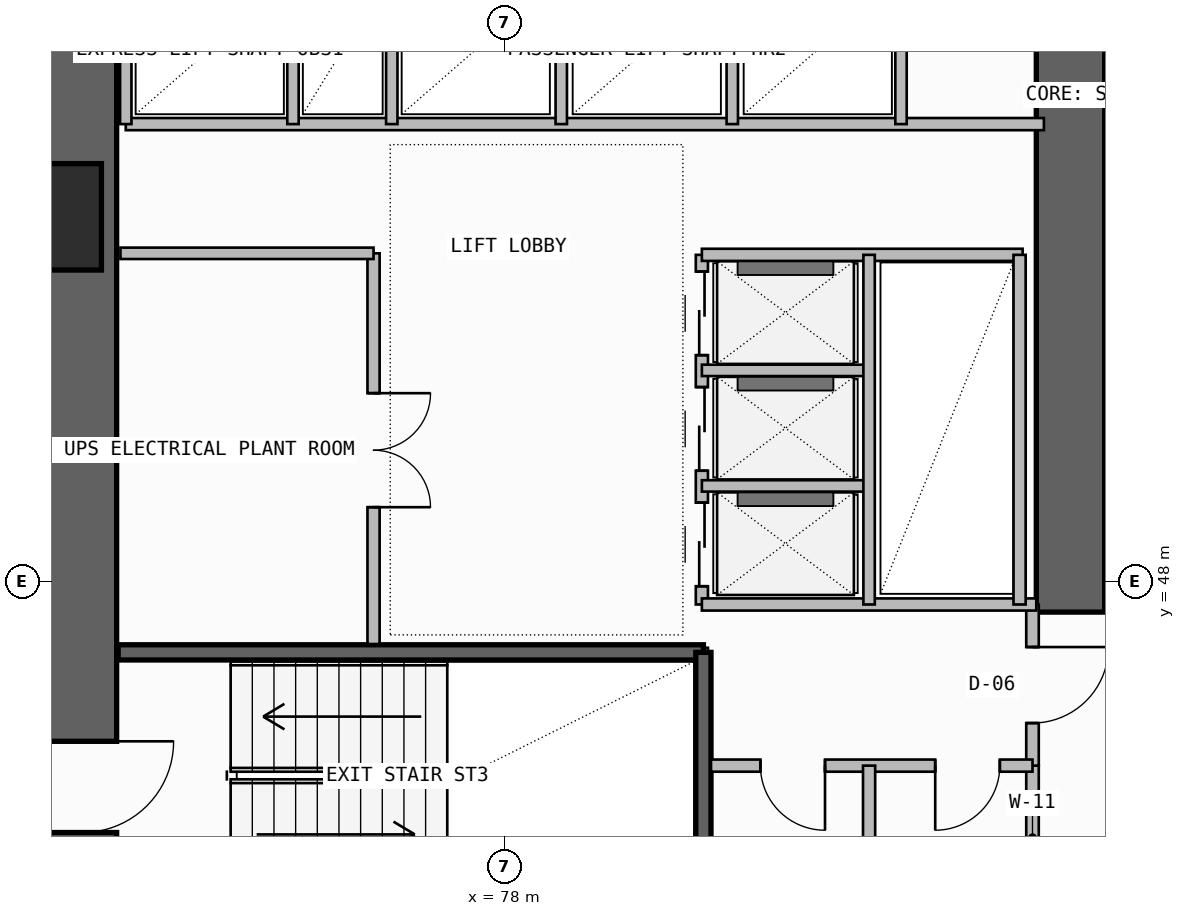
"""IFC4 building model, lengths in metres.
Left out: names, types, materials, properties, quantities, classifications, styles, units other than length and angle.
Written with IfcOpenShell. Run it as: python <this file> out.ifc"""

import sys

from ifc_helpers import new_model, si_unit, direction, frame, frame_2d, origin, origin_2d, place, context, subcontext, project, spatial, rectangle, extrude, element, fill, save


model = new_model("IFC4")
c1 = context("Model", 3, precision=1e-05, world=origin(), true_north=direction((0.0, 1.0)))
c2 = subcontext(c1, "Body", "Model", "MODEL_VIEW")
j1 = project(units=[si_unit("LENGTHUNIT", "METRE"), si_unit("PLANEANGLEUNIT", "RADIAN")], contexts=[c1])
p1 = place(None, origin())
s1 = spatial("IfcSite", under=j1, at=p1, CompositionType="ELEMENT")
p2 = place(p1, origin())
s2 = spatial("IfcBuilding", under=s1, at=p2, CompositionType="ELEMENT")
p3 = place(p2, frame((0.0, 0.0, 110.1)))
s3 = spatial("IfcBuildingStorey", under=s2, at=p3, CompositionType="ELEMENT", Elevation=110.1)
p4 = place(p3, frame((72.45, 43.35, -0.26), z_axis=(0.0, 0.0, 1.0), x_axis=(0.0, 1.0, 0.0)))
e1 = element("IfcWall", 1, at=p4, inside=s3, PredefinedType="SHEAR", context=c2, shape_type="SweptSolid", body=[
    extrude(rectangle(XDim=12.7, YDim=0.9, at=frame_2d((6.35, 0.0))), origin(), (0.0, 0.0, 1.0), 3.6),
])
p5 = place(p4, frame((1.35, 0.0, 0.26)))
e2 = element("IfcOpeningElement", 2, at=p5, cuts=e1, PredefinedType="OPENING", context=c2, shape_type="SweptSolid", body=[
    extrude(rectangle(XDim=1.2, YDim=2.2, at=frame_2d((0.6, 1.1))), frame((0.0, 0.46, 0.0), z_axis=(0.0, -1.0, 0.0), x_axis=(1.0, 0.0, 0.0)), (0.0, 0.0, 1.0), 0.92),
])
p6 = place(p3, frame((85.45, 47.6, -0.26), z_axis=(0.0, 0.0, 1.0), x_axis=(0.0, 1.0, 0.0)))
e3 = element("IfcWall", 3, at=p6, inside=s3, PredefinedType="SHEAR", context=c2, shape_type="SweptSolid", body=[
    extrude(rectangle(XDim=8.45, YDim=0.9, at=frame_2d((4.225, 0.0))), origin(), (0.0, 0.0, 1.0), 3.6),
])
p7 = place(p3, frame((72.0, 52.8, 0.0), z_axis=(0.0, 0.0, 1.0), x_axis=(1.0, 0.0, 0.0)))
e4 = element("IfcColumn", 4, at=p7, inside=s3, PredefinedType="COLUMN", context=c2, shape_type="SweptSolid", body=[
    extrude(rectangle(XDim=1.4, YDim=1.4, at=origin_2d()), origin(), (0.0, 0.0, 1.0), 3.6),
])
p8 = place(p3, frame((72.92, 47.07, -0.26), z_axis=(0.0, 0.0, 1.0), x_axis=(1.0, 0.0, 0.0)))
e5 = element("IfcWall", 5, at=p8, inside=s3, PredefinedType="SOLIDWALL", context=c2, shape_type="SweptSolid", body=[
    extrude(rectangle(XDim=7.7, YDim=0.2, at=frame_2d((3.85, 0.0))), origin(), (0.0, 0.0, 1.0), 3.6),
])
p9 = place(p3, frame((80.62, 43.83, -0.26), z_axis=(0.0, 0.0, 1.0), x_axis=(0.0, 1.0, 0.0)))
e6 = element("IfcWall", 6, at=p9, inside=s3, PredefinedType="SOLIDWALL", context=c2, shape_type="SweptSolid", body=[
    extrude(rectangle(XDim=3.24, YDim=0.2, at=frame_2d((1.62, 0.0))), origin(), (0.0, 0.0, 1.0), 3.6),
])
p10 = place(p3, frame((84.95, 43.68, 0.0), z_axis=(0.0, 0.0, 1.0), x_axis=(0.0, 1.0, 0.0)))
e7 = element("IfcWall", 7, at=p10, inside=s3, PredefinedType="PLUMBINGWALL", context=c2, shape_type="SweptSolid", body=[
    extrude(rectangle(XDim=1.9, YDim=0.165, at=frame_2d((0.95, 0.0))), origin(), (0.0, 0.0, 1.0), 3.34),
])
p11 = place(p3, frame((84.95, 45.58, 0.0), z_axis=(0.0, 0.0, 1.0), x_axis=(0.0, 1.0, 0.0)))
e8 = element("IfcWall", 8, at=p11, inside=s3, PredefinedType="PARTITIONING", context=c2, shape_type="SweptSolid", body=[
    extrude(rectangle(XDim=2.12, YDim=0.165, at=frame_2d((1.06, 0.0))), origin(), (0.0, 0.0, 1.0), 3.34),
])
p12 = place(p11, frame((0.56, 0.0, 0.0)))
e9 = element("IfcOpeningElement", 9, at=p12, cuts=e8, PredefinedType="OPENING", context=c2, shape_type="SweptSolid", body=[
    extrude(rectangle(XDim=1.0, YDim=2.2, at=frame_2d((0.5, 1.1))), frame((0.0, 0.093, 0.0), z_axis=(0.0, -1.0, 0.0), x_axis=(1.0, 0.0, 0.0)), (0.0, 0.0, 1.0), 0.185),
])
p13 = place(p3, frame((80.72, 45.58, 0.0), z_axis=(0.0, 0.0, 1.0), x_axis=(1.0, 0.0, 0.0)))
e10 = element("IfcWall", 10, at=p13, inside=s3, PredefinedType="PLUMBINGWALL", context=c2, shape_type="SweptSolid", body=[
    extrude(rectangle(XDim=4.23, YDim=0.16, at=frame_2d((2.115, 0.0))), origin(), (0.0, 0.0, 1.0), 3.34),
])
p14 = place(p13, frame((0.65, 0.0, 0.0)))
e11 = element("IfcOpeningElement", 11, at=p14, cuts=e10, PredefinedType="OPENING", context=c2, shape_type="SweptSolid", body=[
    extrude(rectangle(XDim=0.85, YDim=2.05, at=frame_2d((0.425, 1.025))), frame((0.0, 0.09, 0.0), z_axis=(0.0, -1.0, 0.0), x_axis=(1.0, 0.0, 0.0)), (0.0, 0.0, 1.0), 0.18),
])
p15 = place(p13, frame((2.95, 0.0, 0.0)))
e12 = element("IfcOpeningElement", 12, at=p15, cuts=e10, PredefinedType="OPENING", context=c2, shape_type="SweptSolid", body=[
    extrude(rectangle(XDim=0.85, YDim=2.05, at=frame_2d((0.425, 1.025))), frame((0.0, 0.09, 0.0), z_axis=(0.0, -1.0, 0.0), x_axis=(1.0, 0.0, 0.0)), (0.0, 0.0, 1.0), 0.18),
])
p16 = place(p3, frame((82.8, 43.68, 0.0), z_axis=(0.0, 0.0, 1.0), x_axis=(0.0, 1.0, 0.0)))
e13 = element("IfcWall", 13, at=p16, inside=s3, PredefinedType="PLUMBINGWALL", context=c2, shape_type="SweptSolid", body=[
    extrude(rectangle(XDim=1.9, YDim=0.16, at=frame_2d((0.95, 0.0))), origin(), (0.0, 0.0, 1.0), 3.34),
])
p17 = place(p3, frame((76.28, 47.18, 0.0), z_axis=(0.0, 0.0, 1.0), x_axis=(0.0, 1.0, 0.0)))
e14 = element("IfcWall", 14, at=p17, inside=s3, PredefinedType="SOLIDWALL", context=c2, shape_type="SweptSolid", body=[
    extrude(rectangle(XDim=5.14, YDim=0.16, at=frame_2d((2.57, 0.0))), origin(), (0.0, 0.0, 1.0), 3.34),
])
p18 = place(p17, frame((1.8, 0.0, 0.0)))
e15 = element("IfcOpeningElement", 15, at=p18, cuts=e14, PredefinedType="OPENING", context=c2, shape_type="SweptSolid", body=[
    extrude(rectangle(XDim=1.5, YDim=2.25, at=frame_2d((0.75, 1.125))), frame((0.0, 0.09, 0.0), z_axis=(0.0, -1.0, 0.0), x_axis=(1.0, 0.0, 0.0)), (0.0, 0.0, 1.0), 0.18),
])
p19 = place(p3, frame((72.95, 52.32, 0.0), z_axis=(0.0, 0.0, 1.0), x_axis=(1.0, 0.0, 0.0)))
e16 = element("IfcWall", 16, at=p19, inside=s3, PredefinedType="SOLIDWALL", context=c2, shape_type="SweptSolid", body=[
    extrude(rectangle(XDim=3.33, YDim=0.15, at=frame_2d((1.665, 0.0))), origin(), (0.0, 0.0, 1.0), 3.34),
])
p20 = place(p3, frame((80.6, 47.7, 0.0), z_axis=(0.0, 0.0, 1.0), x_axis=(0.0, 1.0, 0.0)))
e17 = element("IfcWall", 17, at=p20, inside=s3, PredefinedType="SOLIDWALL", context=c2, shape_type="SweptSolid", body=[
    extrude(rectangle(XDim=4.6, YDim=0.16, at=frame_2d((2.3, 0.0))), origin(), (0.0, 0.0, 1.0), 3.34),
])
p21 = place(p20, frame((0.24, 0.0, 0.0)))
e18 = element("IfcOpeningElement", 18, at=p21, cuts=e17, PredefinedType="OPENING", context=c2, shape_type="SweptSolid", body=[
    extrude(rectangle(XDim=1.1, YDim=2.25, at=frame_2d((0.55, 1.125))), frame((0.0, 0.09, 0.0), z_axis=(0.0, -1.0, 0.0), x_axis=(1.0, 0.0, 0.0)), (0.0, 0.0, 1.0), 0.18),
])
p22 = place(p20, frame((1.76, 0.0, 0.0)))
e19 = element("IfcOpeningElement", 19, at=p22, cuts=e17, PredefinedType="OPENING", context=c2, shape_type="SweptSolid", body=[
    extrude(rectangle(XDim=1.1, YDim=2.25, at=frame_2d((0.55, 1.125))), frame((0.0, 0.09, 0.0), z_axis=(0.0, -1.0, 0.0), x_axis=(1.0, 0.0, 0.0)), (0.0, 0.0, 1.0), 0.18),
])
p23 = place(p20, frame((3.28, 0.0, 0.0)))
e20 = element("IfcOpeningElement", 20, at=p23, cuts=e17, PredefinedType="OPENING", context=c2, shape_type="SweptSolid", body=[
    extrude(rectangle(XDim=1.1, YDim=2.25, at=frame_2d((0.55, 1.125))), frame((0.0, 0.09, 0.0), z_axis=(0.0, -1.0, 0.0), x_axis=(1.0, 0.0, 0.0)), (0.0, 0.0, 1.0), 0.18),
])
p24 = place(p3, frame((80.6, 47.7, 0.0), z_axis=(0.0, 0.0, 1.0), x_axis=(1.0, 0.0, 0.0)))
e21 = element("IfcWall", 21, at=p24, inside=s3, PredefinedType="SOLIDWALL", context=c2, shape_type="SweptSolid", body=[
    extrude(rectangle(XDim=4.4, YDim=0.16, at=frame_2d((2.2, 0.0))), origin(), (0.0, 0.0, 1.0), 3.34),
])
p25 = place(p3, frame((80.6, 52.3, 0.0), z_axis=(0.0, 0.0, 1.0), x_axis=(1.0, 0.0, 0.0)))
e22 = element("IfcWall", 22, at=p25, inside=s3, PredefinedType="SOLIDWALL", context=c2, shape_type="SweptSolid", body=[
    extrude(rectangle(XDim=4.22, YDim=0.16, at=frame_2d((2.11, 0.0))), origin(), (0.0, 0.0, 1.0), 3.34),
])
for number, where, z_axis, x_axis in (
    (23, (80.6, 49.26, 0.0), (0.0, 0.0, 1.0), (1.0, 0.0, 0.0)),
    (24, (80.6, 50.78, 0.0), (0.0, 0.0, 1.0), (1.0, 0.0, 0.0)),
):
    element("IfcWall", number, at=place(p3, frame(where, z_axis=z_axis, x_axis=x_axis)), inside=s3, PredefinedType="PLUMBINGWALL", context=c2, shape_type="SweptSolid", body=[
        extrude(rectangle(XDim=2.2, YDim=0.15, at=frame_2d((1.1, 0.0))), origin(), (0.0, 0.0, 1.0), 3.34),
    ])
p26 = place(p3, frame((82.8, 47.7, 0.0), z_axis=(0.0, 0.0, 1.0), x_axis=(0.0, 1.0, 0.0)))
e25 = element("IfcWall", 25, at=p26, inside=s3, PredefinedType="PLUMBINGWALL", context=c2, shape_type="SweptSolid", body=[
    extrude(rectangle(XDim=4.6, YDim=0.15, at=frame_2d((2.3, 0.0))), origin(), (0.0, 0.0, 1.0), 3.34),
])
p27 = place(p3, frame((84.78, 47.7, 0.0), z_axis=(0.0, 0.0, 1.0), x_axis=(0.0, 1.0, 0.0)))
e26 = element("IfcWall", 26, at=p27, inside=s3, PredefinedType="SOLIDWALL", context=c2, shape_type="SweptSolid", body=[
    extrude(rectangle(XDim=4.6, YDim=0.16, at=frame_2d((2.3, 0.0))), origin(), (0.0, 0.0, 1.0), 3.34),
])
p28 = place(p3, frame((73.02, 54.02, 0.0), z_axis=(0.0, 0.0, 1.0), x_axis=(1.0, 0.0, 0.0)))
e27 = element("IfcWall", 27, at=p28, inside=s3, PredefinedType="SOLIDWALL", context=c2, shape_type="SweptSolid", body=[
    extrude(rectangle(XDim=12.08, YDim=0.16, at=frame_2d((6.04, 0.0))), origin(), (0.0, 0.0, 1.0), 3.34),
])
p29 = place(p3, frame((73.02, 54.02, 0.0), z_axis=(0.0, 0.0, 1.0), x_axis=(0.0, 1.0, 0.0)))
e28 = element("IfcWall", 28, at=p29, inside=s3, PredefinedType="PLUMBINGWALL", context=c2, shape_type="SweptSolid", body=[
    extrude(rectangle(XDim=1.94, YDim=0.15, at=frame_2d((0.97, 0.0))), origin(), (0.0, 0.0, 1.0), 3.34),
])
p30 = place(p3, frame((76.52, 54.02, 0.0), z_axis=(0.0, 0.0, 1.0), x_axis=(0.0, 1.0, 0.0)))
e29 = element("IfcWall", 29, at=p30, inside=s3, PredefinedType="SOLIDWALL", context=c2, shape_type="SweptSolid", body=[
    extrude(rectangle(XDim=1.94, YDim=0.15, at=frame_2d((0.97, 0.0))), origin(), (0.0, 0.0, 1.0), 3.34),
])
p31 = place(p3, frame((75.22, 54.02, 0.0), z_axis=(0.0, 0.0, 1.0), x_axis=(0.0, 1.0, 0.0)))
e30 = element("IfcWall", 30, at=p31, inside=s3, PredefinedType="PLUMBINGWALL", context=c2, shape_type="SweptSolid", body=[
    extrude(rectangle(XDim=1.94, YDim=0.15, at=frame_2d((0.97, 0.0))), origin(), (0.0, 0.0, 1.0), 3.34),
])
for number, where, z_axis, x_axis in (
    (31, (78.75, 54.02, 0.0), (0.0, 0.0, 1.0), (0.0, 1.0, 0.0)),
    (32, (81.0, 54.02, 0.0), (0.0, 0.0, 1.0), (0.0, 1.0, 0.0)),
):
    element("IfcWall", number, at=place(p3, frame(where, z_axis=z_axis, x_axis=x_axis)), inside=s3, PredefinedType="PLUMBINGWALL", context=c2, shape_type="SweptSolid", body=[
        extrude(rectangle(XDim=1.96, YDim=0.15, at=frame_2d((0.98, 0.0))), origin(), (0.0, 0.0, 1.0), 3.34),
    ])
p32 = place(p3, frame((83.22, 54.02, 0.0), z_axis=(0.0, 0.0, 1.0), x_axis=(0.0, 1.0, 0.0)))
e33 = element("IfcWall", 33, at=p32, inside=s3, PredefinedType="SOLIDWALL", context=c2, shape_type="SweptSolid", body=[
    extrude(rectangle(XDim=1.96, YDim=0.15, at=frame_2d((0.98, 0.0))), origin(), (0.0, 0.0, 1.0), 3.34),
])
p33 = place(p5, frame((1.2, 0.0, 0.0), z_axis=(0.0, 0.0, 1.0), x_axis=(-1.0, 0.0, 0.0)))
e34 = element("IfcDoor", 34, at=p33, inside=s3, OperationType="SINGLE_SWING_LEFT", PredefinedType="USERDEFINED", context=c2, shape_type="SweptSolid", body=[
    extrude(rectangle(XDim=1.2, YDim=2.2, at=frame_2d((0.6, 1.1))), frame((0.0, 0.025, 0.0), z_axis=(0.0, -1.0, 0.0), x_axis=(1.0, 0.0, 0.0)), (0.0, 0.0, 1.0), 0.05),
])
fill(e2, e34)
p34 = place(p12, frame((1.0, 0.0, 0.0), z_axis=(0.0, 0.0, 1.0), x_axis=(-1.0, 0.0, 0.0)))
e35 = element("IfcDoor", 35, at=p34, inside=s3, OperationType="SINGLE_SWING_LEFT", PredefinedType="DOOR", context=c2, shape_type="SweptSolid", body=[
    extrude(rectangle(XDim=1.0, YDim=2.2, at=frame_2d((0.5, 1.1))), frame((0.0, 0.025, 0.0), z_axis=(0.0, -1.0, 0.0), x_axis=(1.0, 0.0, 0.0)), (0.0, 0.0, 1.0), 0.05),
])
fill(e9, e35)
p35 = place(p14, frame((0.85, 0.0, 0.0), z_axis=(0.0, 0.0, 1.0), x_axis=(-1.0, 0.0, 0.0)))
e36 = element("IfcDoor", 36, at=p35, inside=s3, OperationType="SINGLE_SWING_LEFT", PredefinedType="DOOR", context=c2, shape_type="SweptSolid", body=[
    extrude(rectangle(XDim=0.85, YDim=2.05, at=frame_2d((0.425, 1.025))), frame((0.0, 0.025, 0.0), z_axis=(0.0, -1.0, 0.0), x_axis=(1.0, 0.0, 0.0)), (0.0, 0.0, 1.0), 0.05),
])
fill(e11, e36)
p36 = place(p15, frame((0.85, 0.0, 0.0), z_axis=(0.0, 0.0, 1.0), x_axis=(-1.0, 0.0, 0.0)))
e37 = element("IfcDoor", 37, at=p36, inside=s3, OperationType="SINGLE_SWING_RIGHT", PredefinedType="DOOR", context=c2, shape_type="SweptSolid", body=[
    extrude(rectangle(XDim=0.85, YDim=2.05, at=frame_2d((0.425, 1.025))), frame((0.0, 0.025, 0.0), z_axis=(0.0, -1.0, 0.0), x_axis=(1.0, 0.0, 0.0)), (0.0, 0.0, 1.0), 0.05),
])
fill(e12, e37)
p37 = place(p18, frame((1.5, 0.0, 0.0), z_axis=(0.0, 0.0, 1.0), x_axis=(-1.0, 0.0, 0.0)))
e38 = element("IfcDoor", 38, at=p37, inside=s3, OperationType="DOUBLE_DOOR_SINGLE_SWING", PredefinedType="DOOR", context=c2, shape_type="SweptSolid", body=[
    extrude(rectangle(XDim=1.5, YDim=2.25, at=frame_2d((0.75, 1.125))), frame((0.0, 0.025, 0.0), z_axis=(0.0, -1.0, 0.0), x_axis=(1.0, 0.0, 0.0)), (0.0, 0.0, 1.0), 0.05),
])
fill(e15, e38)
p38 = place(p21, frame((1.1, 0.0, 0.0), z_axis=(0.0, 0.0, 1.0), x_axis=(-1.0, 0.0, 0.0)))
e39 = element("IfcDoor", 39, at=p38, inside=s3, OperationType="DOUBLE_DOOR_SLIDING", PredefinedType="DOOR", context=c2, shape_type="SweptSolid", body=[
    extrude(rectangle(XDim=1.1, YDim=2.25, at=frame_2d((0.55, 1.125))), frame((0.0, 0.025, 0.0), z_axis=(0.0, -1.0, 0.0), x_axis=(1.0, 0.0, 0.0)), (0.0, 0.0, 1.0), 0.05),
])
fill(e18, e39)
p39 = place(p22, frame((1.1, 0.0, 0.0), z_axis=(0.0, 0.0, 1.0), x_axis=(-1.0, 0.0, 0.0)))
e40 = element("IfcDoor", 40, at=p39, inside=s3, OperationType="DOUBLE_DOOR_SLIDING", PredefinedType="DOOR", context=c2, shape_type="SweptSolid", body=[
    extrude(rectangle(XDim=1.1, YDim=2.25, at=frame_2d((0.55, 1.125))), frame((0.0, 0.025, 0.0), z_axis=(0.0, -1.0, 0.0), x_axis=(1.0, 0.0, 0.0)), (0.0, 0.0, 1.0), 0.05),
])
fill(e19, e40)
p40 = place(p23, frame((1.1, 0.0, 0.0), z_axis=(0.0, 0.0, 1.0), x_axis=(-1.0, 0.0, 0.0)))
e41 = element("IfcDoor", 41, at=p40, inside=s3, OperationType="DOUBLE_DOOR_SLIDING", PredefinedType="DOOR", context=c2, shape_type="SweptSolid", body=[
    extrude(rectangle(XDim=1.1, YDim=2.25, at=frame_2d((0.55, 1.125))), frame((0.0, 0.025, 0.0), z_axis=(0.0, -1.0, 0.0), x_axis=(1.0, 0.0, 0.0)), (0.0, 0.0, 1.0), 0.05),
])
fill(e20, e41)
save(model, sys.argv[1])
